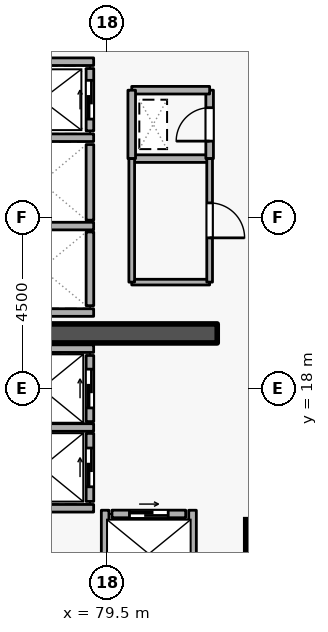
"""IFC4 building model, lengths in metres.
Left out: names, types, materials, properties, quantities, classifications, styles, units other than length and angle.
Written with IfcOpenShell. Run it as: python <this file> out.ifc"""

import sys

from ifc_helpers import new_model, si_unit, direction, frame, frame_2d, origin, origin_2d, place, context, subcontext, project, spatial, rectangle, extrude, element, fill, save


model = new_model("IFC4")
c1 = context("Model", 3, precision=1e-05, world=origin(), true_north=direction((0.0, 1.0)))
c2 = subcontext(c1, "Body", "Model", "MODEL_VIEW")
j1 = project(units=[si_unit("LENGTHUNIT", "METRE"), si_unit("PLANEANGLEUNIT", "RADIAN")], contexts=[c1])
p1 = place(None, origin())
s1 = spatial("IfcSite", under=j1, at=p1, CompositionType="ELEMENT")
p2 = place(p1, origin())
s2 = spatial("IfcBuilding", under=s1, at=p2, CompositionType="ELEMENT")
p3 = place(p2, frame((0.0, 0.0, 167.1)))
s3 = spatial("IfcBuildingStorey", under=s2, at=p3, CompositionType="ELEMENT", Elevation=167.1)
p4 = place(p3, frame((76.6, 19.45, 0.0), z_axis=(0.0, 0.0, 1.0), x_axis=(1.0, 0.0, 0.0)))
e1 = element("IfcWall", 1, at=p4, inside=s3, PredefinedType="SHEAR", context=c2, shape_type="SweptSolid", body=[
    extrude(rectangle(XDim=5.8, YDim=0.5, at=frame_2d((2.9, 0.0))), origin(), (0.0, 0.0, 1.0), 3.6),
])
p5 = place(p3, frame((83.7, 14.0, 0.0), z_axis=(0.0, 0.0, 1.0), x_axis=(1.0, 0.0, 0.0)))
e2 = element("IfcColumn", 2, at=p5, inside=s3, PredefinedType="COLUMN", context=c2, shape_type="SweptSolid", body=[
    extrude(rectangle(XDim=1.1, YDim=1.1, at=origin_2d()), origin(), (0.0, 0.0, 1.0), 3.6),
])
p6 = place(p3, frame((79.05, 24.78, 0.0), z_axis=(0.0, 0.0, 1.0), x_axis=(0.0, 1.0, 0.0)))
e3 = element("IfcWall", 3, at=p6, inside=s3, PredefinedType="STANDARD", context=c2, shape_type="SweptSolid", body=[
    extrude(rectangle(XDim=1.64, YDim=0.2, at=frame_2d((0.82, 0.0))), origin(), (0.0, 0.0, 1.0), 3.34),
])
p7 = place(p6, frame((0.31, 0.0, 0.0)))
e4 = element("IfcOpeningElement", 4, at=p7, cuts=e3, PredefinedType="OPENING", context=c2, shape_type="SweptSolid", body=[
    extrude(rectangle(XDim=1.02, YDim=2.06, at=frame_2d((0.51, 1.03))), frame((0.0, 0.11, 0.0), z_axis=(0.0, -1.0, 0.0), x_axis=(1.0, 0.0, 0.0)), (0.0, 0.0, 1.0), 0.22),
])
p8 = place(p3, frame((79.05, 22.43, 0.0), z_axis=(0.0, 0.0, 1.0), x_axis=(0.0, 1.0, 0.0)))
e5 = element("IfcWall", 5, at=p8, inside=s3, PredefinedType="STANDARD", context=c2, shape_type="SweptSolid", body=[
    extrude(rectangle(XDim=1.99, YDim=0.2, at=frame_2d((0.995, 0.0))), origin(), (0.0, 0.0, 1.0), 3.34),
])
p9 = place(p3, frame((79.05, 20.18, 0.0), z_axis=(0.0, 0.0, 1.0), x_axis=(0.0, 1.0, 0.0)))
e6 = element("IfcWall", 6, at=p9, inside=s3, PredefinedType="STANDARD", context=c2, shape_type="SweptSolid", body=[
    extrude(rectangle(XDim=1.94, YDim=0.2, at=frame_2d((0.97, 0.0))), origin(), (0.0, 0.0, 1.0), 3.34),
])
p10 = place(p3, frame((79.05, 17.13, 0.0), z_axis=(0.0, 0.0, 1.0), x_axis=(0.0, 1.0, 0.0)))
e7 = element("IfcWall", 7, at=p10, inside=s3, PredefinedType="STANDARD", context=c2, shape_type="SweptSolid", body=[
    extrude(rectangle(XDim=1.74, YDim=0.2, at=frame_2d((0.87, 0.0))), origin(), (0.0, 0.0, 1.0), 3.34),
])
p11 = place(p10, frame((0.36, 0.0, 0.0)))
e8 = element("IfcOpeningElement", 8, at=p11, cuts=e7, PredefinedType="OPENING", context=c2, shape_type="SweptSolid", body=[
    extrude(rectangle(XDim=1.02, YDim=2.06, at=frame_2d((0.51, 1.03))), frame((0.0, 0.11, 0.0), z_axis=(0.0, -1.0, 0.0), x_axis=(1.0, 0.0, 0.0)), (0.0, 0.0, 1.0), 0.22),
])
p12 = place(p3, frame((79.05, 15.03, 0.0), z_axis=(0.0, 0.0, 1.0), x_axis=(0.0, 1.0, 0.0)))
e9 = element("IfcWall", 9, at=p12, inside=s3, PredefinedType="STANDARD", context=c2, shape_type="SweptSolid", body=[
    extrude(rectangle(XDim=1.79, YDim=0.2, at=frame_2d((0.895, 0.0))), origin(), (0.0, 0.0, 1.0), 3.34),
])
p13 = place(p12, frame((0.385, 0.0, 0.0)))
e10 = element("IfcOpeningElement", 10, at=p13, cuts=e9, PredefinedType="OPENING", context=c2, shape_type="SweptSolid", body=[
    extrude(rectangle(XDim=1.02, YDim=2.06, at=frame_2d((0.51, 1.03))), frame((0.0, 0.11, 0.0), z_axis=(0.0, -1.0, 0.0), x_axis=(1.0, 0.0, 0.0)), (0.0, 0.0, 1.0), 0.22),
])
p14 = place(p3, frame((79.63, 14.7, 0.0), z_axis=(0.0, 0.0, 1.0), x_axis=(1.0, 0.0, 0.0)))
e11 = element("IfcWall", 11, at=p14, inside=s3, PredefinedType="STANDARD", context=c2, shape_type="SweptSolid", body=[
    extrude(rectangle(XDim=1.94, YDim=0.2, at=frame_2d((0.97, 0.0))), origin(), (0.0, 0.0, 1.0), 3.34),
])
p15 = place(p14, frame((0.46, 0.0, 0.0)))
e12 = element("IfcOpeningElement", 12, at=p15, cuts=e11, PredefinedType="OPENING", context=c2, shape_type="SweptSolid", body=[
    extrude(rectangle(XDim=1.02, YDim=2.06, at=frame_2d((0.51, 1.03))), frame((0.0, 0.11, 0.0), z_axis=(0.0, -1.0, 0.0), x_axis=(1.0, 0.0, 0.0)), (0.0, 0.0, 1.0), 0.22),
])
for number, where, z_axis, x_axis in (
    (13, (76.612, 26.6, 0.0), (0.0, 0.0, 1.0), (1.0, 0.0, 0.0)),
    (14, (76.612, 24.6, 0.0), (0.0, 0.0, 1.0), (1.0, 0.0, 0.0)),
    (15, (76.612, 22.275, 0.0), (0.0, 0.0, 1.0), (1.0, 0.0, 0.0)),
    (16, (76.612, 20.0, 0.0), (0.0, 0.0, 1.0), (1.0, 0.0, 0.0)),
):
    element("IfcWall", number, at=place(p3, frame(where, z_axis=z_axis, x_axis=x_axis)), inside=s3, PredefinedType="STANDARD", context=c2, shape_type="SweptSolid", body=[
        extrude(rectangle(XDim=2.536, YDim=0.2, at=frame_2d((1.268, 0.0))), origin(), (0.0, 0.0, 1.0), 3.34),
    ])
p16 = place(p3, frame((76.402, 19.05, 0.0), z_axis=(0.0, 0.0, 1.0), x_axis=(1.0, 0.0, 0.0)))
e17 = element("IfcWall", 17, at=p16, inside=s3, PredefinedType="STANDARD", context=c2, shape_type="SweptSolid", body=[
    extrude(rectangle(XDim=2.746, YDim=0.2, at=frame_2d((1.373, 0.0))), origin(), (0.0, 0.0, 1.0), 2.545),
])
p17 = place(p3, frame((76.402, 16.975, 0.0), z_axis=(0.0, 0.0, 1.0), x_axis=(1.0, 0.0, 0.0)))
e18 = element("IfcWall", 18, at=p17, inside=s3, PredefinedType="STANDARD", context=c2, shape_type="SweptSolid", body=[
    extrude(rectangle(XDim=2.746, YDim=0.2, at=frame_2d((1.373, 0.0))), origin(), (0.0, 0.0, 1.0), 3.34),
])
p18 = place(p3, frame((76.512, 14.85, 0.0), z_axis=(0.0, 0.0, 1.0), x_axis=(1.0, 0.0, 0.0)))
e19 = element("IfcWall", 19, at=p18, inside=s3, PredefinedType="STANDARD", context=c2, shape_type="SweptSolid", body=[
    extrude(rectangle(XDim=2.636, YDim=0.2, at=frame_2d((1.318, 0.0))), origin(), (0.0, 0.0, 1.0), 3.34),
])
for number, where, z_axis, x_axis in (
    (20, (81.75, 12.612, 0.0), (0.0, 0.0, 1.0), (0.0, 1.0, 0.0)),
    (21, (79.45, 12.612, 0.0), (0.0, 0.0, 1.0), (0.0, 1.0, 0.0)),
):
    element("IfcWall", number, at=place(p3, frame(where, z_axis=z_axis, x_axis=x_axis)), inside=s3, PredefinedType="STANDARD", context=c2, shape_type="SweptSolid", body=[
        extrude(rectangle(XDim=2.186, YDim=0.2, at=frame_2d((1.093, 0.0))), origin(), (0.0, 0.0, 1.0), 3.34),
    ])
p19 = place(p3, frame((80.15, 24.05, 0.0), z_axis=(0.0, 0.0, 1.0), x_axis=(1.0, 0.0, 0.0)))
e22 = element("IfcWall", 22, at=p19, inside=s3, PredefinedType="STANDARD", context=c2, shape_type="SweptSolid", body=[
    extrude(rectangle(XDim=2.05, YDim=0.2, at=frame_2d((1.025, 0.0))), origin(), (0.0, 0.0, 1.0), 3.34),
])
p20 = place(p3, frame((82.2, 24.05, 0.0), z_axis=(0.0, 0.0, 1.0), x_axis=(0.0, 1.0, 0.0)))
e23 = element("IfcWall", 23, at=p20, inside=s3, PredefinedType="STANDARD", context=c2, shape_type="SweptSolid", body=[
    extrude(rectangle(XDim=1.8, YDim=0.2, at=frame_2d((0.9, 0.0))), origin(), (0.0, 0.0, 1.0), 3.34),
])
p21 = place(p20, frame((0.46, 0.0, 0.0)))
e24 = element("IfcOpeningElement", 24, at=p21, cuts=e23, PredefinedType="OPENING", context=c2, shape_type="SweptSolid", body=[
    extrude(rectangle(XDim=0.88, YDim=2.04, at=frame_2d((0.44, 1.02))), frame((0.0, 0.11, 0.0), z_axis=(0.0, -1.0, 0.0), x_axis=(1.0, 0.0, 0.0)), (0.0, 0.0, 1.0), 0.22),
])
p22 = place(p3, frame((82.2, 25.85, 0.0), z_axis=(0.0, 0.0, 1.0), x_axis=(-1.0, 0.0, 0.0)))
e25 = element("IfcWall", 25, at=p22, inside=s3, PredefinedType="STANDARD", context=c2, shape_type="SweptSolid", body=[
    extrude(rectangle(XDim=2.05, YDim=0.2, at=frame_2d((1.025, 0.0))), origin(), (0.0, 0.0, 1.0), 3.34),
])
p23 = place(p3, frame((80.15, 25.85, 0.0), z_axis=(0.0, 0.0, 1.0), x_axis=(0.0, -1.0, 0.0)))
e26 = element("IfcWall", 26, at=p23, inside=s3, PredefinedType="STANDARD", context=c2, shape_type="SweptSolid", body=[
    extrude(rectangle(XDim=1.8, YDim=0.2, at=frame_2d((0.9, 0.0))), origin(), (0.0, 0.0, 1.0), 3.34),
])
p24 = place(p3, frame((82.2, 20.8, 0.0), z_axis=(0.0, 0.0, 1.0), x_axis=(-1.0, 0.0, 0.0)))
e27 = element("IfcWall", 27, at=p24, inside=s3, PredefinedType="PARTITIONING", context=c2, shape_type="SweptSolid", body=[
    extrude(rectangle(XDim=2.05, YDim=0.15, at=frame_2d((1.025, 0.0))), origin(), (0.0, 0.0, 1.0), 3.34),
])
p25 = place(p3, frame((80.15, 20.8, 0.0), z_axis=(0.0, 0.0, 1.0), x_axis=(0.0, 1.0, 0.0)))
e28 = element("IfcWall", 28, at=p25, inside=s3, PredefinedType="PARTITIONING", context=c2, shape_type="SweptSolid", body=[
    extrude(rectangle(XDim=3.25, YDim=0.15, at=frame_2d((1.625, 0.0))), origin(), (0.0, 0.0, 1.0), 3.34),
])
p26 = place(p3, frame((82.2, 24.05, 0.0), z_axis=(0.0, 0.0, 1.0), x_axis=(0.0, -1.0, 0.0)))
e29 = element("IfcWall", 29, at=p26, inside=s3, PredefinedType="PARTITIONING", context=c2, shape_type="SweptSolid", body=[
    extrude(rectangle(XDim=3.25, YDim=0.15, at=frame_2d((1.625, 0.0))), origin(), (0.0, 0.0, 1.0), 3.34),
])
p27 = place(p26, frame((1.165, 0.0, 0.0)))
e30 = element("IfcOpeningElement", 30, at=p27, cuts=e29, PredefinedType="OPENING", context=c2, shape_type="SweptSolid", body=[
    extrude(rectangle(XDim=0.92, YDim=2.08, at=frame_2d((0.46, 1.04))), frame((0.0, 0.085, 0.0), z_axis=(0.0, -1.0, 0.0), x_axis=(1.0, 0.0, 0.0)), (0.0, 0.0, 1.0), 0.17),
])
p28 = place(p7, origin())
e31 = element("IfcDoor", 31, at=p28, inside=s3, OperationType="SLIDING_TO_LEFT", PredefinedType="DOOR", context=c2, shape_type="SweptSolid", body=[
    extrude(rectangle(XDim=1.02, YDim=2.06, at=frame_2d((0.51, 1.03))), frame((0.0, 0.025, 0.0), z_axis=(0.0, -1.0, 0.0), x_axis=(1.0, 0.0, 0.0)), (0.0, 0.0, 1.0), 0.05),
])
fill(e4, e31)
p29 = place(p11, origin())
e32 = element("IfcDoor", 32, at=p29, inside=s3, OperationType="SLIDING_TO_LEFT", PredefinedType="DOOR", context=c2, shape_type="SweptSolid", body=[
    extrude(rectangle(XDim=1.02, YDim=2.06, at=frame_2d((0.51, 1.03))), frame((0.0, 0.025, 0.0), z_axis=(0.0, -1.0, 0.0), x_axis=(1.0, 0.0, 0.0)), (0.0, 0.0, 1.0), 0.05),
])
fill(e8, e32)
p30 = place(p13, origin())
e33 = element("IfcDoor", 33, at=p30, inside=s3, OperationType="SLIDING_TO_LEFT", PredefinedType="DOOR", context=c2, shape_type="SweptSolid", body=[
    extrude(rectangle(XDim=1.02, YDim=2.06, at=frame_2d((0.51, 1.03))), frame((0.0, 0.025, 0.0), z_axis=(0.0, -1.0, 0.0), x_axis=(1.0, 0.0, 0.0)), (0.0, 0.0, 1.0), 0.05),
])
fill(e10, e33)
p31 = place(p15, origin())
e34 = element("IfcDoor", 34, at=p31, inside=s3, OperationType="SLIDING_TO_LEFT", PredefinedType="DOOR", context=c2, shape_type="SweptSolid", body=[
    extrude(rectangle(XDim=1.02, YDim=2.06, at=frame_2d((0.51, 1.03))), frame((0.0, 0.025, 0.0), z_axis=(0.0, -1.0, 0.0), x_axis=(1.0, 0.0, 0.0)), (0.0, 0.0, 1.0), 0.05),
])
fill(e12, e34)
p32 = place(p21, origin())
e35 = element("IfcDoor", 35, at=p32, inside=s3, OperationType="SINGLE_SWING_LEFT", PredefinedType="DOOR", context=c2, shape_type="SweptSolid", body=[
    extrude(rectangle(XDim=0.88, YDim=2.04, at=frame_2d((0.44, 1.02))), frame((0.0, 0.025, 0.0), z_axis=(0.0, -1.0, 0.0), x_axis=(1.0, 0.0, 0.0)), (0.0, 0.0, 1.0), 0.05),
])
fill(e24, e35)
p33 = place(p27, origin())
e36 = element("IfcDoor", 36, at=p33, inside=s3, OperationType="SINGLE_SWING_RIGHT", PredefinedType="DOOR", context=c2, shape_type="SweptSolid", body=[
    extrude(rectangle(XDim=0.92, YDim=2.08, at=frame_2d((0.46, 1.04))), frame((0.0, 0.025, 0.0), z_axis=(0.0, -1.0, 0.0), x_axis=(1.0, 0.0, 0.0)), (0.0, 0.0, 1.0), 0.05),
])
fill(e30, e36)
save(model, sys.argv[1])
